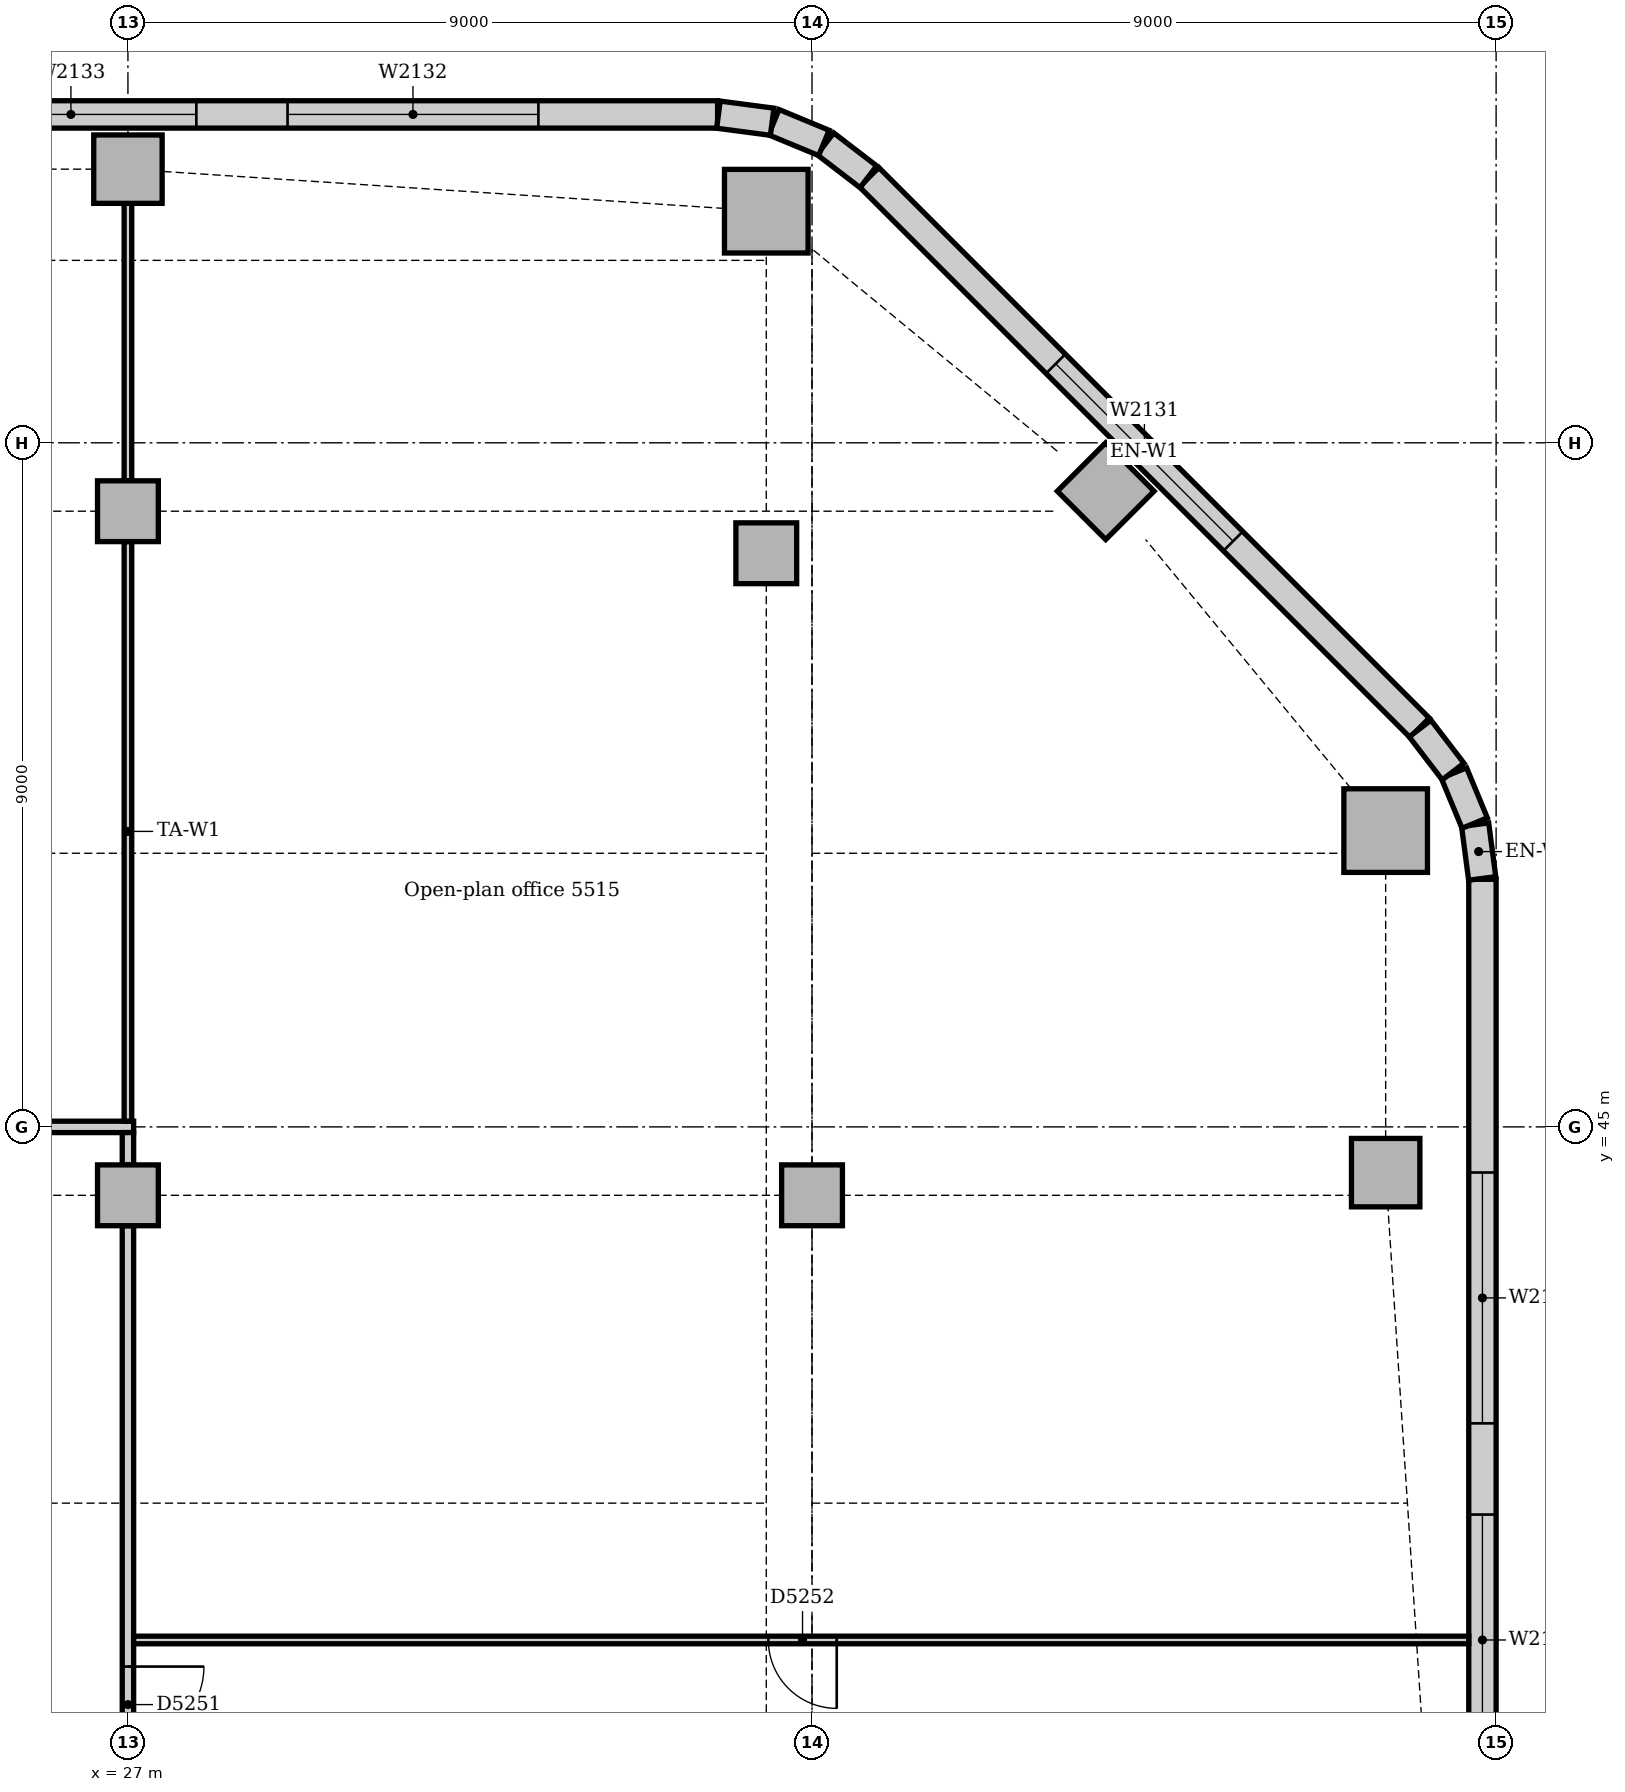
"""IFC4 building model, lengths in metres.
Left out: names, types, materials, properties, quantities, classifications, styles, units other than length and angle.
Written with IfcOpenShell. Run it as: python <this file> out.ifc"""

import sys

from ifc_helpers import new_model, si_unit, direction, frame, frame_2d, origin, origin_2d, place, context, subcontext, project, spatial, rectangle, extrude, element, fill, save


model = new_model("IFC4")
c1 = context("Model", 3, precision=1e-05, world=origin(), true_north=direction((0.0, 1.0)))
c2 = subcontext(c1, "Body", "Model", "MODEL_VIEW")
j1 = project(units=[si_unit("LENGTHUNIT", "METRE"), si_unit("PLANEANGLEUNIT", "RADIAN")], contexts=[c1])
p1 = place(None, origin())
s1 = spatial("IfcSite", under=j1, at=p1, CompositionType="ELEMENT")
p2 = place(p1, origin())
s2 = spatial("IfcBuilding", under=s1, at=p2, CompositionType="ELEMENT")
p3 = place(p2, frame((0.0, 0.0, 230.0)))
s3 = spatial("IfcBuildingStorey", under=s2, at=p3, CompositionType="ELEMENT", Elevation=230.0)
for number, where, z_axis, x_axis in (
    (1, (43.547, 48.898, 0.0), (0.0, 0.0, 1.0), (1.0, 0.0, 0.0)),
    (2, (35.398, 57.047, 0.0), (0.0, 0.0, 1.0), (1.0, 0.0, 0.0)),
):
    element("IfcColumn", number, at=place(p3, frame(where, z_axis=z_axis, x_axis=x_axis)), inside=s3, PredefinedType="COLUMN", context=c2, shape_type="SweptSolid", body=[
        extrude(rectangle(XDim=1.1, YDim=1.1, at=origin_2d()), origin(), (0.0, 0.0, 1.0), 3.85),
    ])
for number, where, z_axis, x_axis in (
    (3, (43.547, 44.398, 0.0), (0.0, 0.0, 1.0), (1.0, 0.0, 0.0)),
    (4, (39.864, 53.364, 0.0), (0.0, 0.0, 1.0), (0.707, 0.707, 0.0)),
    (5, (27.0, 57.6, 0.0), (0.0, 0.0, 1.0), (1.0, 0.0, 0.0)),
):
    element("IfcColumn", number, at=place(p3, frame(where, z_axis=z_axis, x_axis=x_axis)), inside=s3, PredefinedType="COLUMN", context=c2, shape_type="SweptSolid", body=[
        extrude(rectangle(XDim=0.9, YDim=0.9, at=origin_2d()), origin(), (0.0, 0.0, 1.0), 3.85),
    ])
for number, where, z_axis, x_axis in (
    (6, (27.0, 44.1, 0.0), (0.0, 0.0, 1.0), (1.0, 0.0, 0.0)),
    (7, (27.0, 53.1, 0.0), (0.0, 0.0, 1.0), (1.0, 0.0, 0.0)),
    (8, (36.0, 44.1, 0.0), (0.0, 0.0, 1.0), (1.0, 0.0, 0.0)),
    (9, (35.398, 52.547, 0.0), (0.0, 0.0, 1.0), (1.0, 0.0, 0.0)),
):
    element("IfcColumn", number, at=place(p3, frame(where, z_axis=z_axis, x_axis=x_axis)), inside=s3, PredefinedType="COLUMN", context=c2, shape_type="SweptSolid", body=[
        extrude(rectangle(XDim=0.8, YDim=0.8, at=origin_2d()), origin(), (0.0, 0.0, 1.0), 3.85),
    ])
p4 = place(p3, frame((44.82, 23.743, 0.0), z_axis=(0.0, 0.0, 1.0), x_axis=(0.0, 1.0, 0.0)))
e10 = element("IfcWall", 10, at=p4, inside=s3, PredefinedType="STANDARD", context=c2, shape_type="SweptSolid", body=[
    extrude(rectangle(XDim=24.515, YDim=0.36, at=frame_2d((12.257, 0.0))), origin(), (0.0, 0.0, 1.0), 3.85),
])
p5 = place(p4, frame((3.857, 0.0, 0.9)))
e11 = element("IfcOpeningElement", 11, at=p5, cuts=e10, PredefinedType="OPENING", context=c2, shape_type="SweptSolid", body=[
    extrude(rectangle(XDim=3.3, YDim=1.6, at=frame_2d((1.65, 0.8))), frame((0.0, 0.19, 0.0), z_axis=(0.0, -1.0, 0.0), x_axis=(1.0, 0.0, 0.0)), (0.0, 0.0, 1.0), 0.38),
])
p6 = place(p4, frame((8.357, 0.0, 0.9)))
e12 = element("IfcOpeningElement", 12, at=p6, cuts=e10, PredefinedType="OPENING", context=c2, shape_type="SweptSolid", body=[
    extrude(rectangle(XDim=3.3, YDim=1.6, at=frame_2d((1.65, 0.8))), frame((0.0, 0.19, 0.0), z_axis=(0.0, -1.0, 0.0), x_axis=(1.0, 0.0, 0.0)), (0.0, 0.0, 1.0), 0.38),
])
p7 = place(p4, frame((12.857, 0.0, 0.9)))
e13 = element("IfcOpeningElement", 13, at=p7, cuts=e10, PredefinedType="OPENING", context=c2, shape_type="SweptSolid", body=[
    extrude(rectangle(XDim=3.3, YDim=1.6, at=frame_2d((1.65, 0.8))), frame((0.0, 0.19, 0.0), z_axis=(0.0, -1.0, 0.0), x_axis=(1.0, 0.0, 0.0)), (0.0, 0.0, 1.0), 0.38),
])
p8 = place(p4, frame((17.357, 0.0, 0.9)))
e14 = element("IfcOpeningElement", 14, at=p8, cuts=e10, PredefinedType="OPENING", context=c2, shape_type="SweptSolid", body=[
    extrude(rectangle(XDim=3.3, YDim=1.6, at=frame_2d((1.65, 0.8))), frame((0.0, 0.19, 0.0), z_axis=(0.0, -1.0, 0.0), x_axis=(1.0, 0.0, 0.0)), (0.0, 0.0, 1.0), 0.38),
])
p9 = place(p3, frame((43.994, 50.251, 0.0), z_axis=(0.0, 0.0, 1.0), x_axis=(-0.707106781187, 0.707106781187, 0.0)))
e15 = element("IfcWall", 15, at=p9, inside=s3, PredefinedType="STANDARD", context=c2, shape_type="SweptSolid", body=[
    extrude(rectangle(XDim=10.243, YDim=0.36, at=frame_2d((5.121, 0.0))), origin(), (0.0, 0.0, 1.0), 3.85),
])
p10 = place(p9, frame((3.471, 0.0, 0.9)))
e16 = element("IfcOpeningElement", 16, at=p10, cuts=e15, PredefinedType="OPENING", context=c2, shape_type="SweptSolid", body=[
    extrude(rectangle(XDim=3.3, YDim=1.6, at=frame_2d((1.65, 0.8))), frame((0.0, 0.19, 0.0), z_axis=(0.0, -1.0, 0.0), x_axis=(1.0, 0.0, 0.0)), (0.0, 0.0, 1.0), 0.38),
])
p11 = place(p3, frame((34.757, 58.32, 0.0), z_axis=(0.0, 0.0, 1.0), x_axis=(-1.0, 0.0, 0.0)))
e17 = element("IfcWall", 17, at=p11, inside=s3, PredefinedType="STANDARD", context=c2, shape_type="SweptSolid", body=[
    extrude(rectangle(XDim=30.515, YDim=0.36, at=frame_2d((15.257, 0.0))), origin(), (0.0, 0.0, 1.0), 3.85),
])
p12 = place(p11, frame((2.357, 0.0, 0.9)))
e18 = element("IfcOpeningElement", 18, at=p12, cuts=e17, PredefinedType="OPENING", context=c2, shape_type="SweptSolid", body=[
    extrude(rectangle(XDim=3.3, YDim=1.6, at=frame_2d((1.65, 0.8))), frame((0.0, 0.19, 0.0), z_axis=(0.0, -1.0, 0.0), x_axis=(1.0, 0.0, 0.0)), (0.0, 0.0, 1.0), 0.38),
])
p13 = place(p11, frame((6.857, 0.0, 0.9)))
e19 = element("IfcOpeningElement", 19, at=p13, cuts=e17, PredefinedType="OPENING", context=c2, shape_type="SweptSolid", body=[
    extrude(rectangle(XDim=3.3, YDim=1.6, at=frame_2d((1.65, 0.8))), frame((0.0, 0.19, 0.0), z_axis=(0.0, -1.0, 0.0), x_axis=(1.0, 0.0, 0.0)), (0.0, 0.0, 1.0), 0.38),
])
p14 = place(p11, frame((11.357, 0.0, 0.9)))
e20 = element("IfcOpeningElement", 20, at=p14, cuts=e17, PredefinedType="OPENING", context=c2, shape_type="SweptSolid", body=[
    extrude(rectangle(XDim=3.3, YDim=1.6, at=frame_2d((1.65, 0.8))), frame((0.0, 0.19, 0.0), z_axis=(0.0, -1.0, 0.0), x_axis=(1.0, 0.0, 0.0)), (0.0, 0.0, 1.0), 0.38),
])
p15 = place(p11, frame((15.857, 0.0, 0.9)))
e21 = element("IfcOpeningElement", 21, at=p15, cuts=e17, PredefinedType="OPENING", context=c2, shape_type="SweptSolid", body=[
    extrude(rectangle(XDim=3.3, YDim=1.6, at=frame_2d((1.65, 0.8))), frame((0.0, 0.19, 0.0), z_axis=(0.0, -1.0, 0.0), x_axis=(1.0, 0.0, 0.0)), (0.0, 0.0, 1.0), 0.38),
])
p16 = place(p11, frame((20.357, 0.0, 0.9)))
e22 = element("IfcOpeningElement", 22, at=p16, cuts=e17, PredefinedType="OPENING", context=c2, shape_type="SweptSolid", body=[
    extrude(rectangle(XDim=3.3, YDim=1.6, at=frame_2d((1.65, 0.8))), frame((0.0, 0.19, 0.0), z_axis=(0.0, -1.0, 0.0), x_axis=(1.0, 0.0, 0.0)), (0.0, 0.0, 1.0), 0.38),
])
p17 = place(p11, frame((24.857, 0.0, 0.9)))
e23 = element("IfcOpeningElement", 23, at=p17, cuts=e17, PredefinedType="OPENING", context=c2, shape_type="SweptSolid", body=[
    extrude(rectangle(XDim=3.3, YDim=1.6, at=frame_2d((1.65, 0.8))), frame((0.0, 0.19, 0.0), z_axis=(0.0, -1.0, 0.0), x_axis=(1.0, 0.0, 0.0)), (0.0, 0.0, 1.0), 0.38),
])
for number, where, z_axis, x_axis in (
    (24, (44.817, 48.269, 0.0), (0.0, 0.0, 1.0), (-0.131, 0.991, 0.0)),
    (25, (44.718, 48.997, 0.0), (0.0, 0.0, 1.0), (-0.383, 0.924, 0.0)),
):
    element("IfcWall", number, at=place(p3, frame(where, z_axis=z_axis, x_axis=x_axis)), inside=s3, PredefinedType="STANDARD", context=c2, shape_type="SweptSolid", body=[
        extrude(rectangle(XDim=0.713, YDim=0.36, at=frame_2d((0.356, 0.0))), origin(), (0.0, 0.0, 1.0), 3.85),
    ])
for number, where, z_axis, x_axis in (
    (26, (44.434, 49.675, 0.0), (0.0, 0.0, 1.0), (-0.609, 0.793, 0.0)),
    (27, (36.741, 57.5, 0.0), (0.0, 0.0, 1.0), (-0.793, 0.609, 0.0)),
):
    element("IfcWall", number, at=place(p3, frame(where, z_axis=z_axis, x_axis=x_axis)), inside=s3, PredefinedType="STANDARD", context=c2, shape_type="SweptSolid", body=[
        extrude(rectangle(XDim=0.713, YDim=0.36, at=frame_2d((0.357, 0.0))), origin(), (0.0, 0.0, 1.0), 3.85),
    ])
for number, where, z_axis, x_axis in (
    (28, (36.156, 57.945, 0.0), (0.0, 0.0, 1.0), (-0.924, 0.383, 0.0)),
    (29, (35.476, 58.224, 0.0), (0.0, 0.0, 1.0), (-0.991, 0.131, 0.0)),
):
    element("IfcWall", number, at=place(p3, frame(where, z_axis=z_axis, x_axis=x_axis)), inside=s3, PredefinedType="STANDARD", context=c2, shape_type="SweptSolid", body=[
        extrude(rectangle(XDim=0.713, YDim=0.36, at=frame_2d((0.356, 0.0))), origin(), (0.0, 0.0, 1.0), 3.85),
    ])
p18 = place(p3, frame((0.36, 45.0, 0.0), z_axis=(0.0, 0.0, 1.0), x_axis=(1.0, 0.0, 0.0)))
e30 = element("IfcWall", 30, at=p18, inside=s3, PredefinedType="PARTITIONING", context=c2, shape_type="SweptSolid", body=[
    extrude(rectangle(XDim=26.715, YDim=0.15, at=frame_2d((13.357, 0.0))), origin(), (0.0, 0.0, 1.0), 3.85),
])
p19 = place(p18, frame((3.9, 0.0, 0.0)))
e31 = element("IfcOpeningElement", 31, at=p19, cuts=e30, PredefinedType="OPENING", context=c2, shape_type="SweptSolid", body=[
    extrude(rectangle(XDim=1.0, YDim=2.1, at=frame_2d((0.5, 1.05))), frame((0.0, 0.085, 0.0), z_axis=(0.0, -1.0, 0.0), x_axis=(1.0, 0.0, 0.0)), (0.0, 0.0, 1.0), 0.17),
])
p20 = place(p18, frame((16.34, 0.0, 0.0)))
e32 = element("IfcOpeningElement", 32, at=p20, cuts=e30, PredefinedType="OPENING", context=c2, shape_type="SweptSolid", body=[
    extrude(rectangle(XDim=0.9, YDim=2.1, at=frame_2d((0.45, 1.05))), frame((0.0, 0.085, 0.0), z_axis=(0.0, -1.0, 0.0), x_axis=(1.0, 0.0, 0.0)), (0.0, 0.0, 1.0), 0.17),
])
p21 = place(p3, frame((27.0, 36.4, 0.0), z_axis=(0.0, 0.0, 1.0), x_axis=(0.0, 1.0, 0.0)))
e33 = element("IfcWall", 33, at=p21, inside=s3, PredefinedType="PARTITIONING", context=c2, shape_type="SweptSolid", body=[
    extrude(rectangle(XDim=7.3, YDim=0.15, at=frame_2d((3.65, 0.0))), origin(), (0.0, 0.0, 1.0), 3.35),
])
p22 = place(p21, frame((0.5, 0.0, 0.0)))
e34 = element("IfcOpeningElement", 34, at=p22, cuts=e33, PredefinedType="OPENING", context=c2, shape_type="SweptSolid", body=[
    extrude(rectangle(XDim=1.0, YDim=2.1, at=frame_2d((0.5, 1.05))), frame((0.0, 0.085, 0.0), z_axis=(0.0, -1.0, 0.0), x_axis=(1.0, 0.0, 0.0)), (0.0, 0.0, 1.0), 0.17),
])
p23 = place(p3, frame((27.0, 44.5, 0.0), z_axis=(0.0, 0.0, 1.0), x_axis=(0.0, 1.0, 0.0)))
e35 = element("IfcWall", 35, at=p23, inside=s3, PredefinedType="PARTITIONING", context=c2, shape_type="SweptSolid", body=[
    extrude(rectangle(XDim=0.425, YDim=0.15, at=frame_2d((0.212, 0.0))), origin(), (0.0, 0.0, 1.0), 3.85),
])
p24 = place(p3, frame((27.075, 38.25, 0.0), z_axis=(0.0, 0.0, 1.0), x_axis=(1.0, 0.0, 0.0)))
e36 = element("IfcWall", 36, at=p24, inside=s3, PredefinedType="PARTITIONING", context=c2, shape_type="SweptSolid", body=[
    extrude(rectangle(XDim=17.565, YDim=0.1, at=frame_2d((8.783, 0.0))), origin(), (0.0, 0.0, 1.0), 3.85),
])
p25 = place(p24, frame((8.35, 0.0, 0.0)))
e37 = element("IfcOpeningElement", 37, at=p25, cuts=e36, PredefinedType="OPENING", context=c2, shape_type="SweptSolid", body=[
    extrude(rectangle(XDim=0.9, YDim=2.1, at=frame_2d((0.45, 1.05))), frame((0.0, 0.06, 0.0), z_axis=(0.0, -1.0, 0.0), x_axis=(1.0, 0.0, 0.0)), (0.0, 0.0, 1.0), 0.12),
])
p26 = place(p3, frame((27.0, 45.075, 0.0), z_axis=(0.0, 0.0, 1.0), x_axis=(0.0, 1.0, 0.0)))
e38 = element("IfcWall", 38, at=p26, inside=s3, PredefinedType="PARTITIONING", context=c2, shape_type="SweptSolid", body=[
    extrude(rectangle(XDim=7.625, YDim=0.1, at=frame_2d((3.812, 0.0))), origin(), (0.0, 0.0, 1.0), 3.35),
])
p27 = place(p3, frame((27.0, 53.5, 0.0), z_axis=(0.0, 0.0, 1.0), x_axis=(0.0, 1.0, 0.0)))
e39 = element("IfcWall", 39, at=p27, inside=s3, PredefinedType="PARTITIONING", context=c2, shape_type="SweptSolid", body=[
    extrude(rectangle(XDim=3.65, YDim=0.1, at=frame_2d((1.825, 0.0))), origin(), (0.0, 0.0, 1.0), 3.41),
])
p28 = place(p7, origin())
e40 = element("IfcWindow", 40, at=p28, inside=s3, PartitioningType="SINGLE_PANEL", PredefinedType="WINDOW", context=c2, shape_type="SweptSolid", body=[
    extrude(rectangle(XDim=3.3, YDim=1.6, at=frame_2d((1.65, 0.8))), frame((0.0, 0.13, 0.0), z_axis=(0.0, -1.0, 0.0), x_axis=(1.0, 0.0, 0.0)), (0.0, 0.0, 1.0), 0.06),
])
fill(e13, e40)
p29 = place(p8, origin())
e41 = element("IfcWindow", 41, at=p29, inside=s3, PartitioningType="SINGLE_PANEL", PredefinedType="WINDOW", context=c2, shape_type="SweptSolid", body=[
    extrude(rectangle(XDim=3.3, YDim=1.6, at=frame_2d((1.65, 0.8))), frame((0.0, 0.13, 0.0), z_axis=(0.0, -1.0, 0.0), x_axis=(1.0, 0.0, 0.0)), (0.0, 0.0, 1.0), 0.06),
])
fill(e14, e41)
p30 = place(p10, origin())
e42 = element("IfcWindow", 42, at=p30, inside=s3, PartitioningType="SINGLE_PANEL", PredefinedType="WINDOW", context=c2, shape_type="SweptSolid", body=[
    extrude(rectangle(XDim=3.3, YDim=1.6, at=frame_2d((1.65, 0.8))), frame((0.0, 0.13, 0.0), z_axis=(0.0, -1.0, 0.0), x_axis=(1.0, 0.0, 0.0)), (0.0, 0.0, 1.0), 0.06),
])
fill(e16, e42)
p31 = place(p12, origin())
e43 = element("IfcWindow", 43, at=p31, inside=s3, PartitioningType="SINGLE_PANEL", PredefinedType="WINDOW", context=c2, shape_type="SweptSolid", body=[
    extrude(rectangle(XDim=3.3, YDim=1.6, at=frame_2d((1.65, 0.8))), frame((0.0, 0.13, 0.0), z_axis=(0.0, -1.0, 0.0), x_axis=(1.0, 0.0, 0.0)), (0.0, 0.0, 1.0), 0.06),
])
fill(e18, e43)
p32 = place(p13, origin())
e44 = element("IfcWindow", 44, at=p32, inside=s3, PartitioningType="SINGLE_PANEL", PredefinedType="WINDOW", context=c2, shape_type="SweptSolid", body=[
    extrude(rectangle(XDim=3.3, YDim=1.6, at=frame_2d((1.65, 0.8))), frame((0.0, 0.13, 0.0), z_axis=(0.0, -1.0, 0.0), x_axis=(1.0, 0.0, 0.0)), (0.0, 0.0, 1.0), 0.06),
])
fill(e19, e44)
p33 = place(p22, frame((1.0, 0.0, 0.0), z_axis=(0.0, 0.0, 1.0), x_axis=(-1.0, 0.0, 0.0)))
e45 = element("IfcDoor", 45, at=p33, inside=s3, OperationType="SINGLE_SWING_LEFT", PredefinedType="DOOR", context=c2, shape_type="SweptSolid", body=[
    extrude(rectangle(XDim=1.0, YDim=2.1, at=frame_2d((0.5, 1.05))), frame((0.0, 0.025, 0.0), z_axis=(0.0, -1.0, 0.0), x_axis=(1.0, 0.0, 0.0)), (0.0, 0.0, 1.0), 0.05),
])
fill(e34, e45)
p34 = place(p25, frame((0.9, 0.0, 0.0), z_axis=(0.0, 0.0, 1.0), x_axis=(-1.0, 0.0, 0.0)))
e46 = element("IfcDoor", 46, at=p34, inside=s3, OperationType="SINGLE_SWING_LEFT", PredefinedType="DOOR", context=c2, shape_type="SweptSolid", body=[
    extrude(rectangle(XDim=0.9, YDim=2.1, at=frame_2d((0.45, 1.05))), frame((0.0, 0.025, 0.0), z_axis=(0.0, -1.0, 0.0), x_axis=(1.0, 0.0, 0.0)), (0.0, 0.0, 1.0), 0.05),
])
fill(e37, e46)
save(model, sys.argv[1])
